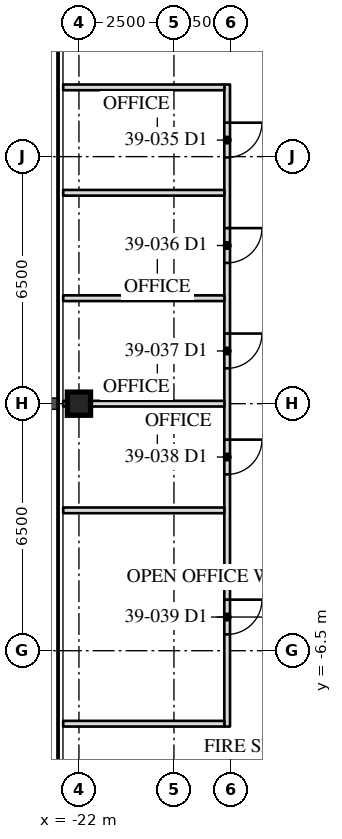
"""IFC4 building model, lengths in metres.
Left out: names, types, materials, properties, quantities, classifications, styles, units other than length and angle.
Written with IfcOpenShell. Run it as: python <this file> out.ifc"""

import sys

from ifc_helpers import new_model, si_unit, direction, frame, frame_2d, origin, origin_2d, place, context, subcontext, project, spatial, rectangle, hollow_rectangle, extrude, element, fill, save


model = new_model("IFC4")
c1 = context("Model", 3, precision=1e-05, world=origin(), true_north=direction((0.0, 1.0)))
c2 = subcontext(c1, "Body", "Model", "MODEL_VIEW")
j1 = project(units=[si_unit("LENGTHUNIT", "METRE"), si_unit("PLANEANGLEUNIT", "RADIAN")], contexts=[c1])
p1 = place(None, origin())
s1 = spatial("IfcSite", under=j1, at=p1, CompositionType="ELEMENT")
p2 = place(p1, origin())
s2 = spatial("IfcBuilding", under=s1, at=p2, CompositionType="ELEMENT")
p3 = place(p2, frame((0.0, 0.0, 166.4)))
s3 = spatial("IfcBuildingStorey", under=s2, at=p3, CompositionType="ELEMENT", Elevation=166.4)
p4 = place(p3, frame((-22.0, 0.0, 0.0), z_axis=(0.0, 0.0, 1.0), x_axis=(0.0, 1.0, 0.0)))
e1 = element("IfcColumn", 1, at=p4, inside=s3, PredefinedType="COLUMN", context=c2, shape_type="SweptSolid", body=[
    extrude(hollow_rectangle(XDim=0.61, YDim=0.61, WallThickness=0.076, at=origin_2d()), origin(), (0.0, 0.0, 1.0), 4.1),
])
p5 = place(p3, frame((-18.1, 8.398, 0.0), z_axis=(0.0, 0.0, 1.0), x_axis=(0.0, -1.0, 0.0)))
e2 = element("IfcWall", 2, at=p5, inside=s3, PredefinedType="PARTITIONING", context=c2, shape_type="SweptSolid", body=[
    extrude(rectangle(XDim=16.894, YDim=0.15, at=frame_2d((8.447, 0.0))), origin(), (0.0, 0.0, 1.0), 3.91),
])
p6 = place(p5, frame((1.004, 0.0, 0.0)))
e3 = element("IfcOpeningElement", 3, at=p6, cuts=e2, PredefinedType="OPENING", context=c2, shape_type="SweptSolid", body=[
    extrude(rectangle(XDim=0.915, YDim=2.134, at=frame_2d((0.458, 1.067))), frame((0.0, 0.085, 0.0), z_axis=(0.0, -1.0, 0.0), x_axis=(1.0, 0.0, 0.0)), (0.0, 0.0, 1.0), 0.17),
])
p7 = place(p5, frame((3.779, 0.0, 0.0)))
e4 = element("IfcOpeningElement", 4, at=p7, cuts=e2, PredefinedType="OPENING", context=c2, shape_type="SweptSolid", body=[
    extrude(rectangle(XDim=0.915, YDim=2.134, at=frame_2d((0.458, 1.067))), frame((0.0, 0.085, 0.0), z_axis=(0.0, -1.0, 0.0), x_axis=(1.0, 0.0, 0.0)), (0.0, 0.0, 1.0), 0.17),
])
p8 = place(p5, frame((6.553, 0.0, 0.0)))
e5 = element("IfcOpeningElement", 5, at=p8, cuts=e2, PredefinedType="OPENING", context=c2, shape_type="SweptSolid", body=[
    extrude(rectangle(XDim=0.915, YDim=2.134, at=frame_2d((0.458, 1.067))), frame((0.0, 0.085, 0.0), z_axis=(0.0, -1.0, 0.0), x_axis=(1.0, 0.0, 0.0)), (0.0, 0.0, 1.0), 0.17),
])
p9 = place(p5, frame((9.344, 0.0, 0.0)))
e6 = element("IfcOpeningElement", 6, at=p9, cuts=e2, PredefinedType="OPENING", context=c2, shape_type="SweptSolid", body=[
    extrude(rectangle(XDim=0.915, YDim=2.134, at=frame_2d((0.458, 1.067))), frame((0.0, 0.085, 0.0), z_axis=(0.0, -1.0, 0.0), x_axis=(1.0, 0.0, 0.0)), (0.0, 0.0, 1.0), 0.17),
])
p10 = place(p5, frame((13.554, 0.0, 0.0)))
e7 = element("IfcOpeningElement", 7, at=p10, cuts=e2, PredefinedType="OPENING", context=c2, shape_type="SweptSolid", body=[
    extrude(rectangle(XDim=0.915, YDim=2.134, at=frame_2d((0.458, 1.067))), frame((0.0, 0.085, 0.0), z_axis=(0.0, -1.0, 0.0), x_axis=(1.0, 0.0, 0.0)), (0.0, 0.0, 1.0), 0.17),
])
for number, where, z_axis, x_axis in (
    (8, (-18.175, 8.323, 0.0), (0.0, 0.0, 1.0), (-1.0, 0.0, 0.0)),
    (9, (-18.175, 5.549, 0.0), (0.0, 0.0, 1.0), (-1.0, 0.0, 0.0)),
    (10, (-18.175, 2.775, 0.0), (0.0, 0.0, 1.0), (-1.0, 0.0, 0.0)),
):
    element("IfcWall", number, at=place(p3, frame(where, z_axis=z_axis, x_axis=x_axis)), inside=s3, PredefinedType="PARTITIONING", context=c2, shape_type="SweptSolid", body=[
        extrude(rectangle(XDim=4.24, YDim=0.15, at=frame_2d((2.12, 0.0))), origin(), (0.0, 0.0, 1.0), 3.91),
    ])
p11 = place(p3, frame((-18.175, 0.0, 0.0), z_axis=(0.0, 0.0, 1.0), x_axis=(-1.0, 0.0, 0.0)))
e11 = element("IfcWall", 11, at=p11, inside=s3, PredefinedType="PARTITIONING", context=c2, shape_type="SweptSolid", body=[
    extrude(rectangle(XDim=4.24, YDim=0.15, at=frame_2d((2.12, 0.0))), origin(), (0.0, 0.0, 1.0), 3.326),
])
for number, where, z_axis, x_axis in (
    (12, (-18.175, -2.807, 0.0), (0.0, 0.0, 1.0), (-1.0, 0.0, 0.0)),
    (13, (-18.175, -8.421, 0.0), (0.0, 0.0, 1.0), (-1.0, 0.0, 0.0)),
):
    element("IfcWall", number, at=place(p3, frame(where, z_axis=z_axis, x_axis=x_axis)), inside=s3, PredefinedType="PARTITIONING", context=c2, shape_type="SweptSolid", body=[
        extrude(rectangle(XDim=4.24, YDim=0.15, at=frame_2d((2.12, 0.0))), origin(), (0.0, 0.0, 1.0), 3.91),
    ])
p12 = place(p6, origin())
e14 = element("IfcDoor", 14, at=p12, inside=s3, OperationType="SINGLE_SWING_LEFT", PredefinedType="DOOR", context=c2, shape_type="SweptSolid", body=[
    extrude(rectangle(XDim=0.915, YDim=2.134, at=frame_2d((0.458, 1.067))), frame((0.0, 0.025, 0.0), z_axis=(0.0, -1.0, 0.0), x_axis=(1.0, 0.0, 0.0)), (0.0, 0.0, 1.0), 0.05),
])
fill(e3, e14)
p13 = place(p7, origin())
e15 = element("IfcDoor", 15, at=p13, inside=s3, OperationType="SINGLE_SWING_LEFT", PredefinedType="DOOR", context=c2, shape_type="SweptSolid", body=[
    extrude(rectangle(XDim=0.915, YDim=2.134, at=frame_2d((0.458, 1.067))), frame((0.0, 0.025, 0.0), z_axis=(0.0, -1.0, 0.0), x_axis=(1.0, 0.0, 0.0)), (0.0, 0.0, 1.0), 0.05),
])
fill(e4, e15)
p14 = place(p8, origin())
e16 = element("IfcDoor", 16, at=p14, inside=s3, OperationType="SINGLE_SWING_LEFT", PredefinedType="DOOR", context=c2, shape_type="SweptSolid", body=[
    extrude(rectangle(XDim=0.915, YDim=2.134, at=frame_2d((0.458, 1.067))), frame((0.0, 0.025, 0.0), z_axis=(0.0, -1.0, 0.0), x_axis=(1.0, 0.0, 0.0)), (0.0, 0.0, 1.0), 0.05),
])
fill(e5, e16)
p15 = place(p9, origin())
e17 = element("IfcDoor", 17, at=p15, inside=s3, OperationType="SINGLE_SWING_LEFT", PredefinedType="DOOR", context=c2, shape_type="SweptSolid", body=[
    extrude(rectangle(XDim=0.915, YDim=2.134, at=frame_2d((0.458, 1.067))), frame((0.0, 0.025, 0.0), z_axis=(0.0, -1.0, 0.0), x_axis=(1.0, 0.0, 0.0)), (0.0, 0.0, 1.0), 0.05),
])
fill(e6, e17)
p16 = place(p10, origin())
e18 = element("IfcDoor", 18, at=p16, inside=s3, OperationType="SINGLE_SWING_LEFT", PredefinedType="DOOR", context=c2, shape_type="SweptSolid", body=[
    extrude(rectangle(XDim=0.915, YDim=2.134, at=frame_2d((0.458, 1.067))), frame((0.0, 0.025, 0.0), z_axis=(0.0, -1.0, 0.0), x_axis=(1.0, 0.0, 0.0)), (0.0, 0.0, 1.0), 0.05),
])
fill(e7, e18)
save(model, sys.argv[1])
